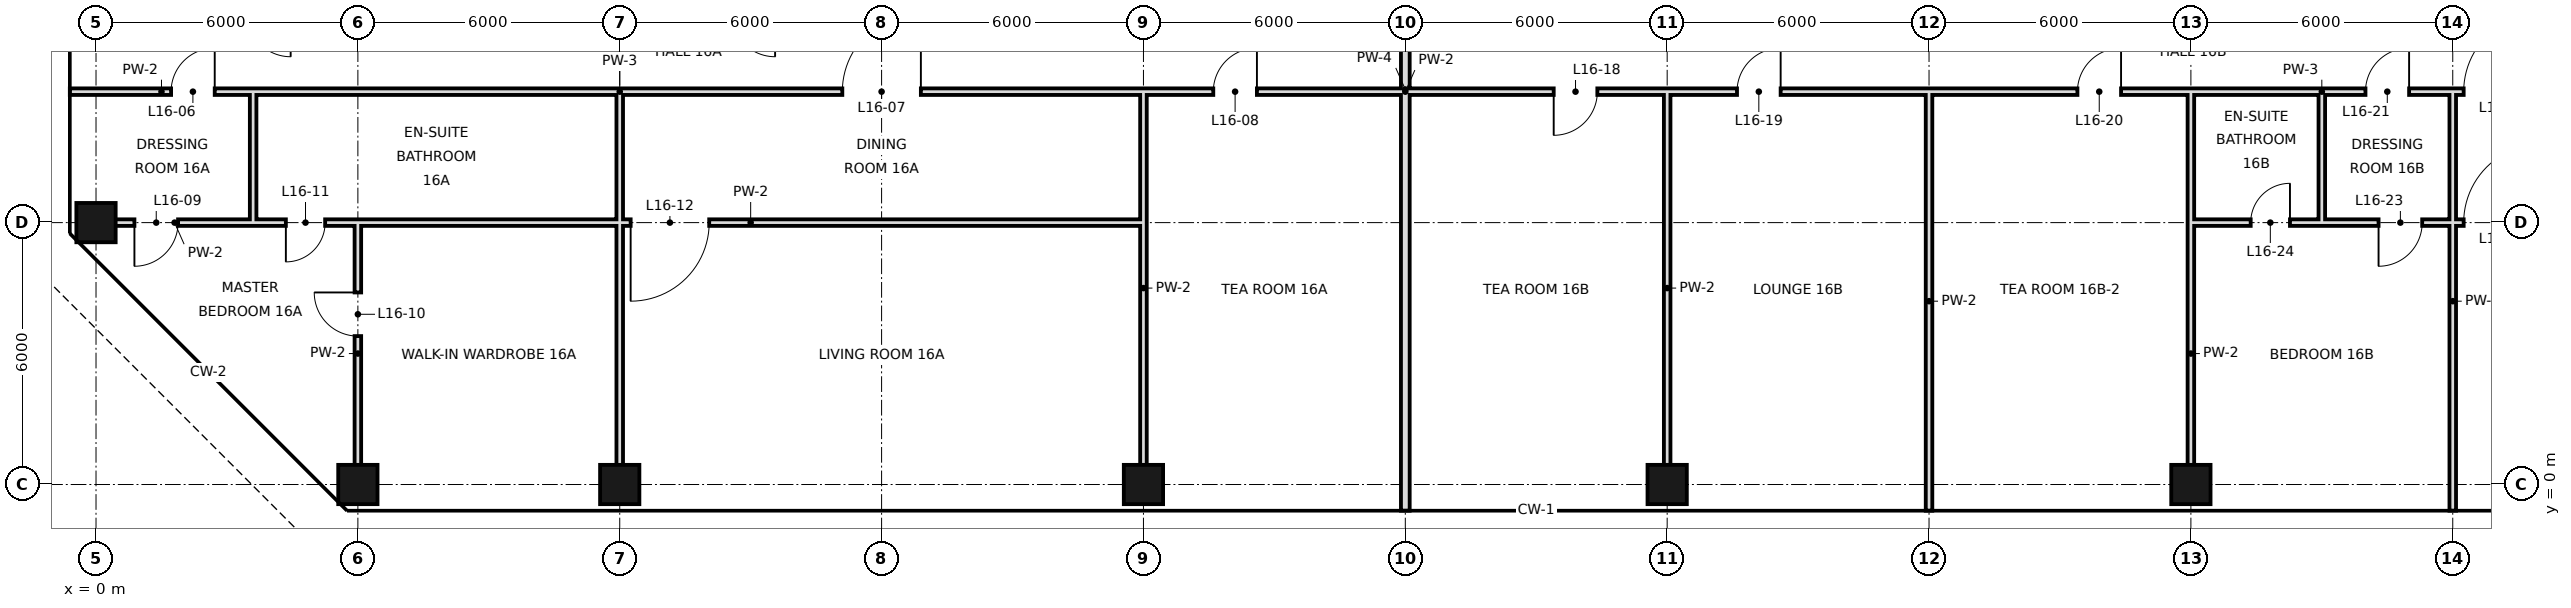
"""IFC4 building model, lengths in metres.
Left out: names, types, materials, properties, quantities, classifications, styles, units other than length and angle.
Written with IfcOpenShell. Run it as: python <this file> out.ifc"""

import sys

from ifc_helpers import new_model, si_unit, direction, frame, frame_2d, origin, origin_2d, place, context, subcontext, project, spatial, rectangle, hollow_rectangle, extrude, element, fill, save


model = new_model("IFC4")
c1 = context("Model", 3, precision=1e-05, world=origin(), true_north=direction((0.0, 1.0)))
c2 = subcontext(c1, "Body", "Model", "MODEL_VIEW")
j1 = project(units=[si_unit("LENGTHUNIT", "METRE"), si_unit("PLANEANGLEUNIT", "RADIAN")], contexts=[c1])
p1 = place(None, origin())
s1 = spatial("IfcSite", under=j1, at=p1, CompositionType="ELEMENT")
p2 = place(p1, origin())
s2 = spatial("IfcBuilding", under=s1, at=p2, CompositionType="ELEMENT")
p3 = place(p2, frame((0.0, 0.0, 78.6)))
s3 = spatial("IfcBuildingStorey", under=s2, at=p3, CompositionType="ELEMENT", Elevation=78.6)
for number, where, z_axis, x_axis in (
    (1, (0.0, 6.0, 0.0), (0.0, 0.0, 1.0), (1.0, 0.0, 0.0)),
    (2, (6.0, 0.0, 0.0), (0.0, 0.0, 1.0), (1.0, 0.0, 0.0)),
    (3, (12.0, 0.0, 0.0), (0.0, 0.0, 1.0), (1.0, 0.0, 0.0)),
    (4, (24.0, 0.0, 0.0), (0.0, 0.0, 1.0), (1.0, 0.0, 0.0)),
    (5, (36.0, 0.0, 0.0), (0.0, 0.0, 1.0), (1.0, 0.0, 0.0)),
    (6, (48.0, 0.0, 0.0), (0.0, 0.0, 1.0), (1.0, 0.0, 0.0)),
):
    element("IfcColumn", number, at=place(p3, frame(where, z_axis=z_axis, x_axis=x_axis)), inside=s3, PredefinedType="COLUMN", context=c2, shape_type="SweptSolid", body=[
        extrude(hollow_rectangle(XDim=0.9, YDim=0.9, WallThickness=0.045, at=origin_2d()), origin(), (0.0, 0.0, 1.0), 3.6),
    ])
p4 = place(p3, frame((12.0, 0.0, 0.0), z_axis=(0.0, 0.0, 1.0), x_axis=(0.0, 1.0, 0.0)))
e7 = element("IfcWall", 7, at=p4, inside=s3, PredefinedType="PARTITIONING", context=c2, shape_type="SweptSolid", body=[
    extrude(rectangle(XDim=6.0, YDim=0.15, at=frame_2d((3.0, 0.0))), origin(), (0.0, 0.0, 1.0), 2.72),
])
p5 = place(p3, frame((12.0, 6.0, 0.0), z_axis=(0.0, 0.0, 1.0), x_axis=(0.0, 1.0, 0.0)))
e8 = element("IfcWall", 8, at=p5, inside=s3, PredefinedType="PARTITIONING", context=c2, shape_type="SweptSolid", body=[
    extrude(rectangle(XDim=3.0, YDim=0.15, at=frame_2d((1.5, 0.0))), origin(), (0.0, 0.0, 1.0), 2.72),
])
p6 = place(p3, frame((24.0, 0.0, 0.0), z_axis=(0.0, 0.0, 1.0), x_axis=(0.0, 1.0, 0.0)))
e9 = element("IfcWall", 9, at=p6, inside=s3, PredefinedType="PARTITIONING", context=c2, shape_type="SweptSolid", body=[
    extrude(rectangle(XDim=9.0, YDim=0.15, at=frame_2d((4.5, 0.0))), origin(), (0.0, 0.0, 1.0), 2.72),
])
p7 = place(p3, frame((3.6, 6.0, 0.0), z_axis=(0.0, 0.0, 1.0), x_axis=(0.0, 1.0, 0.0)))
e10 = element("IfcWall", 10, at=p7, inside=s3, PredefinedType="PARTITIONING", context=c2, shape_type="SweptSolid", body=[
    extrude(rectangle(XDim=3.0, YDim=0.15, at=frame_2d((1.5, 0.0))), origin(), (0.0, 0.0, 1.0), 3.42),
])
p8 = place(p3, frame((30.0, -0.6, 0.0), z_axis=(0.0, 0.0, 1.0), x_axis=(0.0, 1.0, 0.0)))
e11 = element("IfcWall", 11, at=p8, inside=s3, PredefinedType="SOLIDWALL", context=c2, shape_type="SweptSolid", body=[
    extrude(rectangle(XDim=19.3, YDim=0.2, at=frame_2d((9.65, 0.0))), origin(), (0.0, 0.0, 1.0), 2.72),
])
p9 = place(p3, frame((36.0, 0.0, 0.0), z_axis=(0.0, 0.0, 1.0), x_axis=(0.0, 1.0, 0.0)))
e12 = element("IfcWall", 12, at=p9, inside=s3, PredefinedType="PARTITIONING", context=c2, shape_type="SweptSolid", body=[
    extrude(rectangle(XDim=9.0, YDim=0.15, at=frame_2d((4.5, 0.0))), origin(), (0.0, 0.0, 1.0), 2.72),
])
p10 = place(p3, frame((42.0, -0.6, 0.0), z_axis=(0.0, 0.0, 1.0), x_axis=(0.0, 1.0, 0.0)))
e13 = element("IfcWall", 13, at=p10, inside=s3, PredefinedType="PARTITIONING", context=c2, shape_type="SweptSolid", body=[
    extrude(rectangle(XDim=9.6, YDim=0.15, at=frame_2d((4.8, 0.0))), origin(), (0.0, 0.0, 1.0), 2.72),
])
p11 = place(p3, frame((48.0, 0.0, 0.0), z_axis=(0.0, 0.0, 1.0), x_axis=(0.0, 1.0, 0.0)))
e14 = element("IfcWall", 14, at=p11, inside=s3, PredefinedType="PARTITIONING", context=c2, shape_type="SweptSolid", body=[
    extrude(rectangle(XDim=6.0, YDim=0.15, at=frame_2d((3.0, 0.0))), origin(), (0.0, 0.0, 1.0), 2.72),
])
p12 = place(p3, frame((48.0, 6.0, 0.0), z_axis=(0.0, 0.0, 1.0), x_axis=(0.0, 1.0, 0.0)))
e15 = element("IfcWall", 15, at=p12, inside=s3, PredefinedType="PARTITIONING", context=c2, shape_type="SweptSolid", body=[
    extrude(rectangle(XDim=3.0, YDim=0.15, at=frame_2d((1.5, 0.0))), origin(), (0.0, 0.0, 1.0), 2.72),
])
p13 = place(p3, frame((51.0, 6.0, 0.0), z_axis=(0.0, 0.0, 1.0), x_axis=(0.0, 1.0, 0.0)))
e16 = element("IfcWall", 16, at=p13, inside=s3, PredefinedType="PARTITIONING", context=c2, shape_type="SweptSolid", body=[
    extrude(rectangle(XDim=3.0, YDim=0.15, at=frame_2d((1.5, 0.0))), origin(), (0.0, 0.0, 1.0), 3.42),
])
p14 = place(p3, frame((54.0, -0.6, 0.0), z_axis=(0.0, 0.0, 1.0), x_axis=(0.0, 1.0, 0.0)))
e17 = element("IfcWall", 17, at=p14, inside=s3, PredefinedType="PARTITIONING", context=c2, shape_type="SweptSolid", body=[
    extrude(rectangle(XDim=9.6, YDim=0.15, at=frame_2d((4.8, 0.0))), origin(), (0.0, 0.0, 1.0), 3.42),
])
p15 = place(p3, frame((6.0, 0.0, 0.0), z_axis=(0.0, 0.0, 1.0), x_axis=(0.0, 1.0, 0.0)))
e18 = element("IfcWall", 18, at=p15, inside=s3, PredefinedType="PARTITIONING", context=c2, shape_type="SweptSolid", body=[
    extrude(rectangle(XDim=6.0, YDim=0.15, at=frame_2d((3.0, 0.0))), origin(), (0.0, 0.0, 1.0), 2.72),
])
p16 = place(p15, frame((3.4, 0.0, 0.0)))
e19 = element("IfcOpeningElement", 19, at=p16, cuts=e18, PredefinedType="OPENING", context=c2, shape_type="SweptSolid", body=[
    extrude(rectangle(XDim=1.0, YDim=2.4, at=frame_2d((0.5, 1.2))), frame((0.0, 0.085, 0.0), z_axis=(0.0, -1.0, 0.0), x_axis=(1.0, 0.0, 0.0)), (0.0, 0.0, 1.0), 0.17),
])
p17 = place(p3, frame((0.0, 6.0, 0.0), z_axis=(0.0, 0.0, 1.0), x_axis=(1.0, 0.0, 0.0)))
e20 = element("IfcWall", 20, at=p17, inside=s3, PredefinedType="PARTITIONING", context=c2, shape_type="SweptSolid", body=[
    extrude(rectangle(XDim=3.6, YDim=0.15, at=frame_2d((1.8, 0.0))), origin(), (0.0, 0.0, 1.0), 2.97),
])
p18 = place(p17, frame((0.88, 0.0, 0.0)))
e21 = element("IfcOpeningElement", 21, at=p18, cuts=e20, PredefinedType="OPENING", context=c2, shape_type="SweptSolid", body=[
    extrude(rectangle(XDim=1.0, YDim=2.4, at=frame_2d((0.5, 1.2))), frame((0.0, 0.085, 0.0), z_axis=(0.0, -1.0, 0.0), x_axis=(1.0, 0.0, 0.0)), (0.0, 0.0, 1.0), 0.17),
])
p19 = place(p3, frame((12.0, 6.0, 0.0), z_axis=(0.0, 0.0, 1.0), x_axis=(1.0, 0.0, 0.0)))
e22 = element("IfcWall", 22, at=p19, inside=s3, PredefinedType="PARTITIONING", context=c2, shape_type="SweptSolid", body=[
    extrude(rectangle(XDim=12.0, YDim=0.15, at=frame_2d((6.0, 0.0))), origin(), (0.0, 0.0, 1.0), 2.72),
])
p20 = place(p19, frame((0.25, 0.0, 0.0)))
e23 = element("IfcOpeningElement", 23, at=p20, cuts=e22, PredefinedType="OPENING", context=c2, shape_type="SweptSolid", body=[
    extrude(rectangle(XDim=1.8, YDim=2.4, at=frame_2d((0.9, 1.2))), frame((0.0, 0.085, 0.0), z_axis=(0.0, -1.0, 0.0), x_axis=(1.0, 0.0, 0.0)), (0.0, 0.0, 1.0), 0.17),
])
p21 = place(p3, frame((51.0, 6.0, 0.0), z_axis=(0.0, 0.0, 1.0), x_axis=(1.0, 0.0, 0.0)))
e24 = element("IfcWall", 24, at=p21, inside=s3, PredefinedType="PARTITIONING", context=c2, shape_type="SweptSolid", body=[
    extrude(rectangle(XDim=15.0, YDim=0.15, at=frame_2d((7.5, 0.0))), origin(), (0.0, 0.0, 1.0), 2.52),
])
p22 = place(p21, frame((1.3, 0.0, 0.0)))
e25 = element("IfcOpeningElement", 25, at=p22, cuts=e24, PredefinedType="OPENING", context=c2, shape_type="SweptSolid", body=[
    extrude(rectangle(XDim=1.0, YDim=2.4, at=frame_2d((0.5, 1.2))), frame((0.0, 0.085, 0.0), z_axis=(0.0, -1.0, 0.0), x_axis=(1.0, 0.0, 0.0)), (0.0, 0.0, 1.0), 0.17),
])
p23 = place(p21, frame((3.25, 0.0, 0.0)))
e26 = element("IfcOpeningElement", 26, at=p23, cuts=e24, PredefinedType="OPENING", context=c2, shape_type="SweptSolid", body=[
    extrude(rectangle(XDim=1.8, YDim=2.4, at=frame_2d((0.9, 1.2))), frame((0.0, 0.085, 0.0), z_axis=(0.0, -1.0, 0.0), x_axis=(1.0, 0.0, 0.0)), (0.0, 0.0, 1.0), 0.17),
])
p24 = place(p3, frame((3.6, 6.0, 0.0), z_axis=(0.0, 0.0, 1.0), x_axis=(1.0, 0.0, 0.0)))
e27 = element("IfcWall", 27, at=p24, inside=s3, PredefinedType="PARTITIONING", context=c2, shape_type="SweptSolid", body=[
    extrude(rectangle(XDim=8.4, YDim=0.15, at=frame_2d((4.2, 0.0))), origin(), (0.0, 0.0, 1.0), 2.97),
])
p25 = place(p24, frame((0.75, 0.0, 0.0)))
e28 = element("IfcOpeningElement", 28, at=p25, cuts=e27, PredefinedType="OPENING", context=c2, shape_type="SweptSolid", body=[
    extrude(rectangle(XDim=0.9, YDim=2.4, at=frame_2d((0.45, 1.2))), frame((0.0, 0.085, 0.0), z_axis=(0.0, -1.0, 0.0), x_axis=(1.0, 0.0, 0.0)), (0.0, 0.0, 1.0), 0.17),
])
p26 = place(p3, frame((48.0, 6.0, 0.0), z_axis=(0.0, 0.0, 1.0), x_axis=(1.0, 0.0, 0.0)))
e29 = element("IfcWall", 29, at=p26, inside=s3, PredefinedType="PARTITIONING", context=c2, shape_type="SweptSolid", body=[
    extrude(rectangle(XDim=3.0, YDim=0.15, at=frame_2d((1.5, 0.0))), origin(), (0.0, 0.0, 1.0), 2.52),
])
p27 = place(p26, frame((1.37, 0.0, 0.0)))
e30 = element("IfcOpeningElement", 30, at=p27, cuts=e29, PredefinedType="OPENING", context=c2, shape_type="SweptSolid", body=[
    extrude(rectangle(XDim=0.9, YDim=2.4, at=frame_2d((0.45, 1.2))), frame((0.0, 0.085, 0.0), z_axis=(0.0, -1.0, 0.0), x_axis=(1.0, 0.0, 0.0)), (0.0, 0.0, 1.0), 0.17),
])
p28 = place(p3, frame((-0.6, 9.0, 0.0), z_axis=(0.0, 0.0, 1.0), x_axis=(1.0, 0.0, 0.0)))
e31 = element("IfcWall", 31, at=p28, inside=s3, PredefinedType="PARTITIONING", context=c2, shape_type="SweptSolid", body=[
    extrude(rectangle(XDim=4.2, YDim=0.15, at=frame_2d((2.1, 0.0))), origin(), (0.0, 0.0, 1.0), 3.42),
])
p29 = place(p28, frame((2.32, 0.0, 0.0)))
e32 = element("IfcOpeningElement", 32, at=p29, cuts=e31, PredefinedType="OPENING", context=c2, shape_type="SweptSolid", body=[
    extrude(rectangle(XDim=1.0, YDim=2.4, at=frame_2d((0.5, 1.2))), frame((0.0, 0.085, 0.0), z_axis=(0.0, -1.0, 0.0), x_axis=(1.0, 0.0, 0.0)), (0.0, 0.0, 1.0), 0.17),
])
p30 = place(p3, frame((12.0, 9.0, 0.0), z_axis=(0.0, 0.0, 1.0), x_axis=(1.0, 0.0, 0.0)))
e33 = element("IfcWall", 33, at=p30, inside=s3, PredefinedType="PARTITIONING", context=c2, shape_type="SweptSolid", body=[
    extrude(rectangle(XDim=36.0, YDim=0.15, at=frame_2d((18.0, 0.0))), origin(), (0.0, 0.0, 1.0), 3.42),
])
p31 = place(p30, frame((5.1, 0.0, 0.0)))
e34 = element("IfcOpeningElement", 34, at=p31, cuts=e33, PredefinedType="OPENING", context=c2, shape_type="SweptSolid", body=[
    extrude(rectangle(XDim=1.8, YDim=2.4, at=frame_2d((0.9, 1.2))), frame((0.0, 0.085, 0.0), z_axis=(0.0, -1.0, 0.0), x_axis=(1.0, 0.0, 0.0)), (0.0, 0.0, 1.0), 0.17),
])
p32 = place(p30, frame((13.6, 0.0, 0.0)))
e35 = element("IfcOpeningElement", 35, at=p32, cuts=e33, PredefinedType="OPENING", context=c2, shape_type="SweptSolid", body=[
    extrude(rectangle(XDim=1.0, YDim=2.4, at=frame_2d((0.5, 1.2))), frame((0.0, 0.085, 0.0), z_axis=(0.0, -1.0, 0.0), x_axis=(1.0, 0.0, 0.0)), (0.0, 0.0, 1.0), 0.17),
])
p33 = place(p30, frame((21.4, 0.0, 0.0)))
e36 = element("IfcOpeningElement", 36, at=p33, cuts=e33, PredefinedType="OPENING", context=c2, shape_type="SweptSolid", body=[
    extrude(rectangle(XDim=1.0, YDim=2.4, at=frame_2d((0.5, 1.2))), frame((0.0, 0.085, 0.0), z_axis=(0.0, -1.0, 0.0), x_axis=(1.0, 0.0, 0.0)), (0.0, 0.0, 1.0), 0.17),
])
p34 = place(p30, frame((25.6, 0.0, 0.0)))
e37 = element("IfcOpeningElement", 37, at=p34, cuts=e33, PredefinedType="OPENING", context=c2, shape_type="SweptSolid", body=[
    extrude(rectangle(XDim=1.0, YDim=2.4, at=frame_2d((0.5, 1.2))), frame((0.0, 0.085, 0.0), z_axis=(0.0, -1.0, 0.0), x_axis=(1.0, 0.0, 0.0)), (0.0, 0.0, 1.0), 0.17),
])
p35 = place(p30, frame((33.4, 0.0, 0.0)))
e38 = element("IfcOpeningElement", 38, at=p35, cuts=e33, PredefinedType="OPENING", context=c2, shape_type="SweptSolid", body=[
    extrude(rectangle(XDim=1.0, YDim=2.4, at=frame_2d((0.5, 1.2))), frame((0.0, 0.085, 0.0), z_axis=(0.0, -1.0, 0.0), x_axis=(1.0, 0.0, 0.0)), (0.0, 0.0, 1.0), 0.17),
])
p36 = place(p3, frame((51.0, 9.0, 0.0), z_axis=(0.0, 0.0, 1.0), x_axis=(1.0, 0.0, 0.0)))
e39 = element("IfcWall", 39, at=p36, inside=s3, PredefinedType="PARTITIONING", context=c2, shape_type="SweptSolid", body=[
    extrude(rectangle(XDim=15.6, YDim=0.15, at=frame_2d((7.8, 0.0))), origin(), (0.0, 0.0, 1.0), 3.42),
])
p37 = place(p36, frame((1.0, 0.0, 0.0)))
e40 = element("IfcOpeningElement", 40, at=p37, cuts=e39, PredefinedType="OPENING", context=c2, shape_type="SweptSolid", body=[
    extrude(rectangle(XDim=1.0, YDim=2.4, at=frame_2d((0.5, 1.2))), frame((0.0, 0.085, 0.0), z_axis=(0.0, -1.0, 0.0), x_axis=(1.0, 0.0, 0.0)), (0.0, 0.0, 1.0), 0.17),
])
p38 = place(p36, frame((3.25, 0.0, 0.0)))
e41 = element("IfcOpeningElement", 41, at=p38, cuts=e39, PredefinedType="OPENING", context=c2, shape_type="SweptSolid", body=[
    extrude(rectangle(XDim=1.8, YDim=2.4, at=frame_2d((0.9, 1.2))), frame((0.0, 0.085, 0.0), z_axis=(0.0, -1.0, 0.0), x_axis=(1.0, 0.0, 0.0)), (0.0, 0.0, 1.0), 0.17),
])
p39 = place(p3, frame((3.6, 9.0, 0.0), z_axis=(0.0, 0.0, 1.0), x_axis=(1.0, 0.0, 0.0)))
e42 = element("IfcWall", 42, at=p39, inside=s3, PredefinedType="PARTITIONING", context=c2, shape_type="SweptSolid", body=[
    extrude(rectangle(XDim=8.4, YDim=0.15, at=frame_2d((4.2, 0.0))), origin(), (0.0, 0.0, 1.0), 3.42),
])
p40 = place(p3, frame((48.0, 9.0, 0.0), z_axis=(0.0, 0.0, 1.0), x_axis=(1.0, 0.0, 0.0)))
e43 = element("IfcWall", 43, at=p40, inside=s3, PredefinedType="PARTITIONING", context=c2, shape_type="SweptSolid", body=[
    extrude(rectangle(XDim=3.0, YDim=0.15, at=frame_2d((1.5, 0.0))), origin(), (0.0, 0.0, 1.0), 3.42),
])
p41 = place(p29, frame((1.0, 0.0, 0.0), z_axis=(0.0, 0.0, 1.0), x_axis=(-1.0, 0.0, 0.0)))
e44 = element("IfcDoor", 44, at=p41, inside=s3, OperationType="SINGLE_SWING_LEFT", PredefinedType="DOOR", context=c2, shape_type="SweptSolid", body=[
    extrude(rectangle(XDim=1.0, YDim=2.4, at=frame_2d((0.5, 1.2))), frame((0.0, 0.025, 0.0), z_axis=(0.0, -1.0, 0.0), x_axis=(1.0, 0.0, 0.0)), (0.0, 0.0, 1.0), 0.05),
])
fill(e32, e44)
p42 = place(p31, frame((1.8, 0.0, 0.0), z_axis=(0.0, 0.0, 1.0), x_axis=(-1.0, 0.0, 0.0)))
e45 = element("IfcDoor", 45, at=p42, inside=s3, OperationType="SINGLE_SWING_LEFT", PredefinedType="DOOR", context=c2, shape_type="SweptSolid", body=[
    extrude(rectangle(XDim=1.8, YDim=2.4, at=frame_2d((0.9, 1.2))), frame((0.0, 0.025, 0.0), z_axis=(0.0, -1.0, 0.0), x_axis=(1.0, 0.0, 0.0)), (0.0, 0.0, 1.0), 0.05),
])
fill(e34, e45)
p43 = place(p32, frame((1.0, 0.0, 0.0), z_axis=(0.0, 0.0, 1.0), x_axis=(-1.0, 0.0, 0.0)))
e46 = element("IfcDoor", 46, at=p43, inside=s3, OperationType="SINGLE_SWING_LEFT", PredefinedType="DOOR", context=c2, shape_type="SweptSolid", body=[
    extrude(rectangle(XDim=1.0, YDim=2.4, at=frame_2d((0.5, 1.2))), frame((0.0, 0.025, 0.0), z_axis=(0.0, -1.0, 0.0), x_axis=(1.0, 0.0, 0.0)), (0.0, 0.0, 1.0), 0.05),
])
fill(e35, e46)
p44 = place(p18, frame((1.0, 0.0, 0.0), z_axis=(0.0, 0.0, 1.0), x_axis=(-1.0, 0.0, 0.0)))
e47 = element("IfcDoor", 47, at=p44, inside=s3, OperationType="SINGLE_SWING_RIGHT", PredefinedType="DOOR", context=c2, shape_type="SweptSolid", body=[
    extrude(rectangle(XDim=1.0, YDim=2.4, at=frame_2d((0.5, 1.2))), frame((0.0, 0.025, 0.0), z_axis=(0.0, -1.0, 0.0), x_axis=(1.0, 0.0, 0.0)), (0.0, 0.0, 1.0), 0.05),
])
fill(e21, e47)
p45 = place(p16, frame((1.0, 0.0, 0.0), z_axis=(0.0, 0.0, 1.0), x_axis=(-1.0, 0.0, 0.0)))
e48 = element("IfcDoor", 48, at=p45, inside=s3, OperationType="SINGLE_SWING_LEFT", PredefinedType="DOOR", context=c2, shape_type="SweptSolid", body=[
    extrude(rectangle(XDim=1.0, YDim=2.4, at=frame_2d((0.5, 1.2))), frame((0.0, 0.025, 0.0), z_axis=(0.0, -1.0, 0.0), x_axis=(1.0, 0.0, 0.0)), (0.0, 0.0, 1.0), 0.05),
])
fill(e19, e48)
p46 = place(p25, frame((0.9, 0.0, 0.0), z_axis=(0.0, 0.0, 1.0), x_axis=(-1.0, 0.0, 0.0)))
e49 = element("IfcDoor", 49, at=p46, inside=s3, OperationType="SINGLE_SWING_RIGHT", PredefinedType="DOOR", context=c2, shape_type="SweptSolid", body=[
    extrude(rectangle(XDim=0.9, YDim=2.4, at=frame_2d((0.45, 1.2))), frame((0.0, 0.025, 0.0), z_axis=(0.0, -1.0, 0.0), x_axis=(1.0, 0.0, 0.0)), (0.0, 0.0, 1.0), 0.05),
])
fill(e28, e49)
p47 = place(p20, frame((1.8, 0.0, 0.0), z_axis=(0.0, 0.0, 1.0), x_axis=(-1.0, 0.0, 0.0)))
e50 = element("IfcDoor", 50, at=p47, inside=s3, OperationType="SINGLE_SWING_RIGHT", PredefinedType="DOOR", context=c2, shape_type="SweptSolid", body=[
    extrude(rectangle(XDim=1.8, YDim=2.4, at=frame_2d((0.9, 1.2))), frame((0.0, 0.025, 0.0), z_axis=(0.0, -1.0, 0.0), x_axis=(1.0, 0.0, 0.0)), (0.0, 0.0, 1.0), 0.05),
])
fill(e23, e50)
p48 = place(p33, frame((1.0, 0.0, 0.0), z_axis=(0.0, 0.0, 1.0), x_axis=(-1.0, 0.0, 0.0)))
e51 = element("IfcDoor", 51, at=p48, inside=s3, OperationType="SINGLE_SWING_RIGHT", PredefinedType="DOOR", context=c2, shape_type="SweptSolid", body=[
    extrude(rectangle(XDim=1.0, YDim=2.4, at=frame_2d((0.5, 1.2))), frame((0.0, 0.025, 0.0), z_axis=(0.0, -1.0, 0.0), x_axis=(1.0, 0.0, 0.0)), (0.0, 0.0, 1.0), 0.05),
])
fill(e36, e51)
p49 = place(p34, frame((1.0, 0.0, 0.0), z_axis=(0.0, 0.0, 1.0), x_axis=(-1.0, 0.0, 0.0)))
e52 = element("IfcDoor", 52, at=p49, inside=s3, OperationType="SINGLE_SWING_LEFT", PredefinedType="DOOR", context=c2, shape_type="SweptSolid", body=[
    extrude(rectangle(XDim=1.0, YDim=2.4, at=frame_2d((0.5, 1.2))), frame((0.0, 0.025, 0.0), z_axis=(0.0, -1.0, 0.0), x_axis=(1.0, 0.0, 0.0)), (0.0, 0.0, 1.0), 0.05),
])
fill(e37, e52)
p50 = place(p35, frame((1.0, 0.0, 0.0), z_axis=(0.0, 0.0, 1.0), x_axis=(-1.0, 0.0, 0.0)))
e53 = element("IfcDoor", 53, at=p50, inside=s3, OperationType="SINGLE_SWING_LEFT", PredefinedType="DOOR", context=c2, shape_type="SweptSolid", body=[
    extrude(rectangle(XDim=1.0, YDim=2.4, at=frame_2d((0.5, 1.2))), frame((0.0, 0.025, 0.0), z_axis=(0.0, -1.0, 0.0), x_axis=(1.0, 0.0, 0.0)), (0.0, 0.0, 1.0), 0.05),
])
fill(e38, e53)
p51 = place(p37, frame((1.0, 0.0, 0.0), z_axis=(0.0, 0.0, 1.0), x_axis=(-1.0, 0.0, 0.0)))
e54 = element("IfcDoor", 54, at=p51, inside=s3, OperationType="SINGLE_SWING_LEFT", PredefinedType="DOOR", context=c2, shape_type="SweptSolid", body=[
    extrude(rectangle(XDim=1.0, YDim=2.4, at=frame_2d((0.5, 1.2))), frame((0.0, 0.025, 0.0), z_axis=(0.0, -1.0, 0.0), x_axis=(1.0, 0.0, 0.0)), (0.0, 0.0, 1.0), 0.05),
])
fill(e40, e54)
p52 = place(p38, frame((1.8, 0.0, 0.0), z_axis=(0.0, 0.0, 1.0), x_axis=(-1.0, 0.0, 0.0)))
e55 = element("IfcDoor", 55, at=p52, inside=s3, OperationType="SINGLE_SWING_LEFT", PredefinedType="DOOR", context=c2, shape_type="SweptSolid", body=[
    extrude(rectangle(XDim=1.8, YDim=2.4, at=frame_2d((0.9, 1.2))), frame((0.0, 0.025, 0.0), z_axis=(0.0, -1.0, 0.0), x_axis=(1.0, 0.0, 0.0)), (0.0, 0.0, 1.0), 0.05),
])
fill(e41, e55)
p53 = place(p22, frame((1.0, 0.0, 0.0), z_axis=(0.0, 0.0, 1.0), x_axis=(-1.0, 0.0, 0.0)))
e56 = element("IfcDoor", 56, at=p53, inside=s3, OperationType="SINGLE_SWING_RIGHT", PredefinedType="DOOR", context=c2, shape_type="SweptSolid", body=[
    extrude(rectangle(XDim=1.0, YDim=2.4, at=frame_2d((0.5, 1.2))), frame((0.0, 0.025, 0.0), z_axis=(0.0, -1.0, 0.0), x_axis=(1.0, 0.0, 0.0)), (0.0, 0.0, 1.0), 0.05),
])
fill(e25, e56)
p54 = place(p27, frame((0.9, 0.0, 0.0), z_axis=(0.0, 0.0, 1.0), x_axis=(-1.0, 0.0, 0.0)))
e57 = element("IfcDoor", 57, at=p54, inside=s3, OperationType="SINGLE_SWING_LEFT", PredefinedType="DOOR", context=c2, shape_type="SweptSolid", body=[
    extrude(rectangle(XDim=0.9, YDim=2.4, at=frame_2d((0.45, 1.2))), frame((0.0, 0.025, 0.0), z_axis=(0.0, -1.0, 0.0), x_axis=(1.0, 0.0, 0.0)), (0.0, 0.0, 1.0), 0.05),
])
fill(e30, e57)
p55 = place(p23, frame((1.8, 0.0, 0.0), z_axis=(0.0, 0.0, 1.0), x_axis=(-1.0, 0.0, 0.0)))
e58 = element("IfcDoor", 58, at=p55, inside=s3, OperationType="SINGLE_SWING_LEFT", PredefinedType="DOOR", context=c2, shape_type="SweptSolid", body=[
    extrude(rectangle(XDim=1.8, YDim=2.4, at=frame_2d((0.9, 1.2))), frame((0.0, 0.025, 0.0), z_axis=(0.0, -1.0, 0.0), x_axis=(1.0, 0.0, 0.0)), (0.0, 0.0, 1.0), 0.05),
])
fill(e26, e58)
save(model, sys.argv[1])
